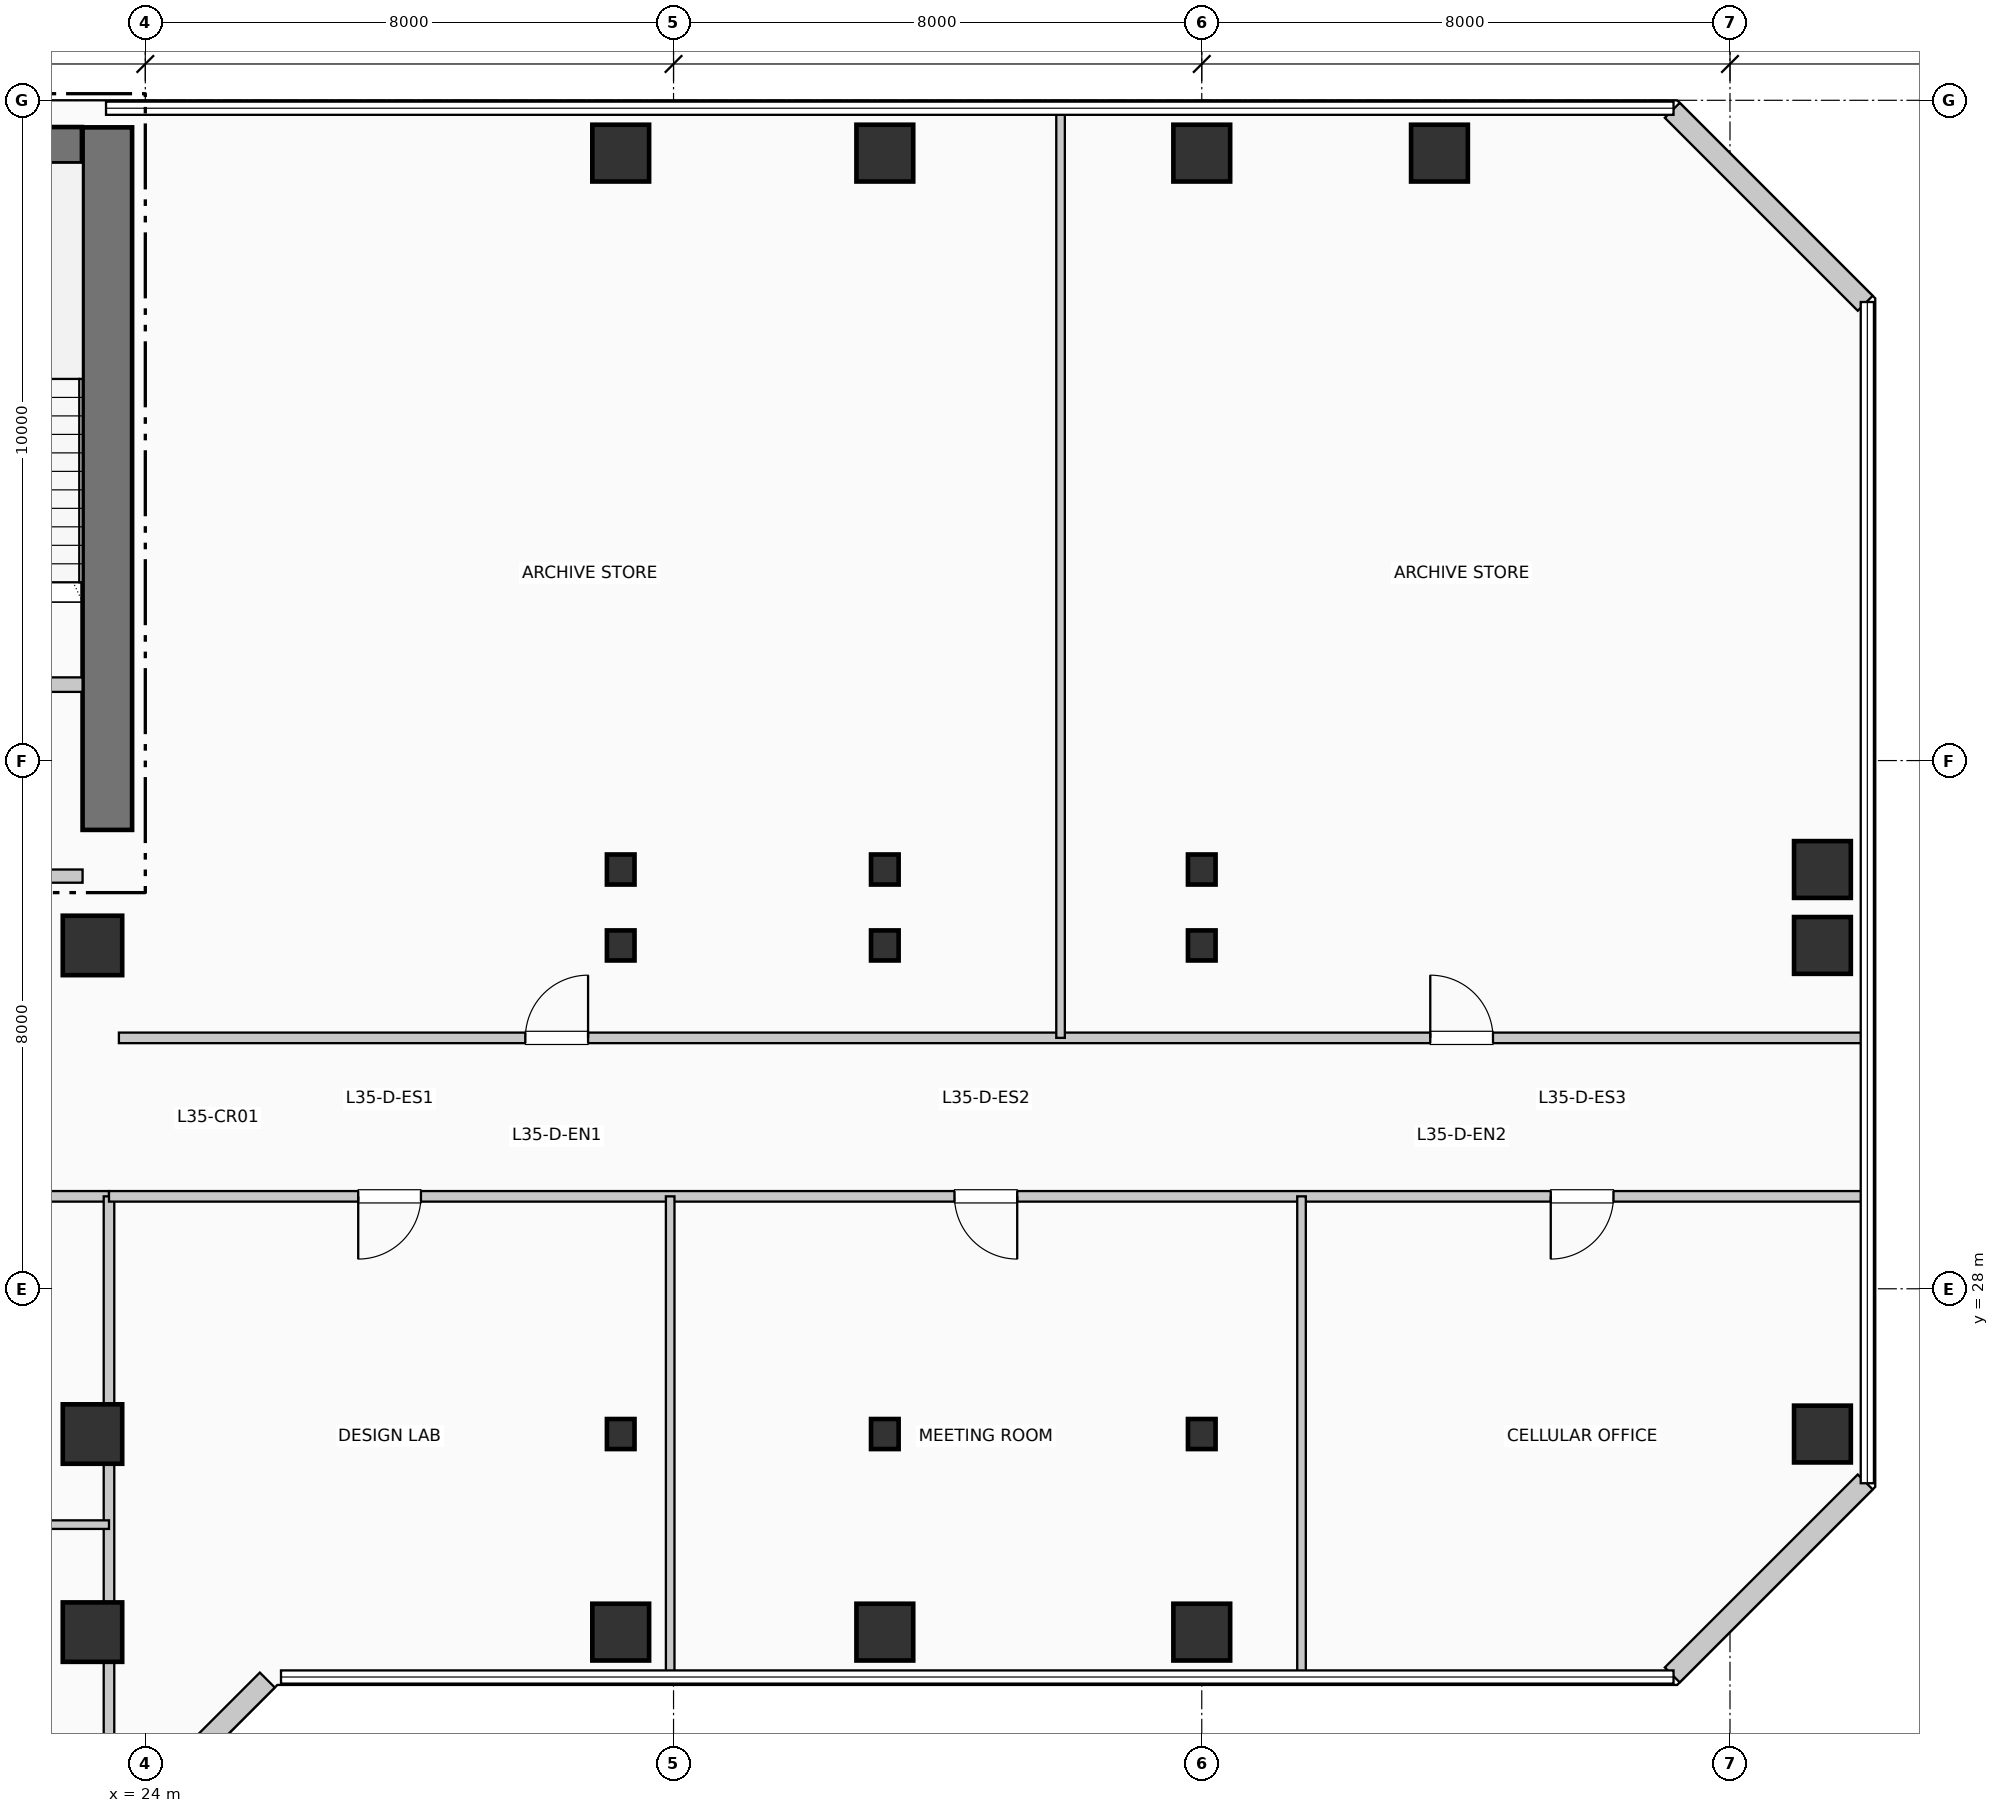
"""IFC4 building model, lengths in metres.
Left out: names, types, materials, properties, quantities, classifications, styles, units other than length and angle.
Written with IfcOpenShell. Run it as: python <this file> out.ifc"""

import sys

from ifc_helpers import new_model, si_unit, direction, frame, frame_2d, origin, origin_2d, place, context, subcontext, project, spatial, rectangle, i_section, extrude, element, fill, save


model = new_model("IFC4")
c1 = context("Model", 3, precision=1e-05, world=origin(), true_north=direction((0.0, 1.0)))
c2 = subcontext(c1, "Body", "Model", "MODEL_VIEW")
j1 = project(units=[si_unit("LENGTHUNIT", "METRE"), si_unit("PLANEANGLEUNIT", "RADIAN")], contexts=[c1])
p1 = place(None, origin())
s1 = spatial("IfcSite", under=j1, at=p1, CompositionType="ELEMENT")
p2 = place(p1, origin())
s2 = spatial("IfcBuilding", under=s1, at=p2, CompositionType="ELEMENT")
p3 = place(p2, frame((0.0, 0.0, 146.85)))
s3 = spatial("IfcBuildingStorey", under=s2, at=p3, CompositionType="ELEMENT", Elevation=146.85)
p4 = place(p3, frame((23.425, 34.95, 0.0), z_axis=(0.0, 0.0, 1.0), x_axis=(0.0, 1.0, 0.0)))
e1 = element("IfcWall", 1, at=p4, inside=s3, PredefinedType="SHEAR", context=c2, shape_type="SweptSolid", body=[
    extrude(rectangle(XDim=10.64, YDim=0.75, at=frame_2d((5.32, 0.0))), origin(), (0.0, 0.0, 1.0), 3.96),
])
p5 = place(p3, frame((19.35, 45.32, 0.0), z_axis=(0.0, 0.0, 1.0), x_axis=(1.0, 0.0, 0.0)))
e2 = element("IfcWall", 2, at=p5, inside=s3, PredefinedType="SHEAR", context=c2, shape_type="SweptSolid", body=[
    extrude(rectangle(XDim=3.69, YDim=0.55, at=frame_2d((1.845, 0.0))), origin(), (0.0, 0.0, 1.0), 3.96),
])
p6 = place(p5, frame((1.15, 0.0, 1.05)))
e3 = element("IfcOpeningElement", 3, at=p6, cuts=e2, PredefinedType="OPENING", context=c2, shape_type="SweptSolid", body=[
    extrude(rectangle(XDim=1.4, YDim=1.8, at=frame_2d((0.7, 0.9))), frame((0.0, 0.285, 0.0), z_axis=(0.0, -1.0, 0.0), x_axis=(1.0, 0.0, 0.0)), (0.0, 0.0, 1.0), 0.57),
])
for number, where, z_axis, x_axis in (
    (4, (23.2, 22.8, 0.0), (0.0, 0.0, 1.0), (1.0, 0.0, 0.0)),
    (5, (23.2, 25.8, 0.0), (0.0, 0.0, 1.0), (1.0, 0.0, 0.0)),
    (6, (23.2, 33.2, 0.0), (0.0, 0.0, 1.0), (1.0, 0.0, 0.0)),
):
    element("IfcColumn", number, at=place(p3, frame(where, z_axis=z_axis, x_axis=x_axis)), inside=s3, PredefinedType="COLUMN", context=c2, shape_type="SweptSolid", body=[
        extrude(rectangle(XDim=0.9, YDim=0.9, at=origin_2d()), origin(), (0.0, 0.0, 1.0), 3.96),
    ])
p7 = place(p3, frame((31.2, 22.8, 0.0), z_axis=(0.0, 0.0, 1.0), x_axis=(1.0, 0.0, 0.0)))
e7 = element("IfcColumn", 7, at=p7, inside=s3, PredefinedType="COLUMN", context=c2, shape_type="SweptSolid", body=[
    extrude(rectangle(XDim=0.86, YDim=0.86, at=origin_2d()), origin(), (0.0, 0.0, 1.0), 3.96),
])
for number, where, z_axis, x_axis in (
    (8, (31.2, 25.8, 0.0), (0.0, 0.0, 1.0), (1.0, 0.0, 0.0)),
    (9, (31.2, 33.2, 0.0), (0.0, 0.0, 1.0), (1.0, 0.0, 0.0)),
    (10, (31.2, 34.35, 0.0), (0.0, 0.0, 1.0), (1.0, 0.0, 0.0)),
):
    element("IfcColumn", number, at=place(p3, frame(where, z_axis=z_axis, x_axis=x_axis)), inside=s3, PredefinedType="COLUMN", context=c2, shape_type="SweptSolid", body=[
        extrude(i_section(OverallWidth=0.418, OverallDepth=0.455, WebThickness=0.032, FlangeThickness=0.051, at=origin_2d()), origin(), (0.0, 0.0, 1.0), 3.96),
    ])
for number, where, z_axis, x_axis in (
    (11, (31.2, 45.2, 0.0), (0.0, 0.0, 1.0), (1.0, 0.0, 0.0)),
    (12, (35.2, 22.8, 0.0), (0.0, 0.0, 1.0), (1.0, 0.0, 0.0)),
):
    element("IfcColumn", number, at=place(p3, frame(where, z_axis=z_axis, x_axis=x_axis)), inside=s3, PredefinedType="COLUMN", context=c2, shape_type="SweptSolid", body=[
        extrude(rectangle(XDim=0.86, YDim=0.86, at=origin_2d()), origin(), (0.0, 0.0, 1.0), 3.96),
    ])
for number, where, z_axis, x_axis in (
    (13, (35.2, 25.8, 0.0), (0.0, 0.0, 1.0), (1.0, 0.0, 0.0)),
    (14, (35.2, 33.2, 0.0), (0.0, 0.0, 1.0), (1.0, 0.0, 0.0)),
    (15, (35.2, 34.35, 0.0), (0.0, 0.0, 1.0), (1.0, 0.0, 0.0)),
):
    element("IfcColumn", number, at=place(p3, frame(where, z_axis=z_axis, x_axis=x_axis)), inside=s3, PredefinedType="COLUMN", context=c2, shape_type="SweptSolid", body=[
        extrude(i_section(OverallWidth=0.418, OverallDepth=0.455, WebThickness=0.032, FlangeThickness=0.051, at=origin_2d()), origin(), (0.0, 0.0, 1.0), 3.96),
    ])
for number, where, z_axis, x_axis in (
    (16, (35.2, 45.2, 0.0), (0.0, 0.0, 1.0), (1.0, 0.0, 0.0)),
    (17, (40.0, 22.8, 0.0), (0.0, 0.0, 1.0), (1.0, 0.0, 0.0)),
):
    element("IfcColumn", number, at=place(p3, frame(where, z_axis=z_axis, x_axis=x_axis)), inside=s3, PredefinedType="COLUMN", context=c2, shape_type="SweptSolid", body=[
        extrude(rectangle(XDim=0.86, YDim=0.86, at=origin_2d()), origin(), (0.0, 0.0, 1.0), 3.96),
    ])
for number, where, z_axis, x_axis in (
    (18, (40.0, 25.8, 0.0), (0.0, 0.0, 1.0), (1.0, 0.0, 0.0)),
    (19, (40.0, 33.2, 0.0), (0.0, 0.0, 1.0), (1.0, 0.0, 0.0)),
    (20, (40.0, 34.35, 0.0), (0.0, 0.0, 1.0), (1.0, 0.0, 0.0)),
):
    element("IfcColumn", number, at=place(p3, frame(where, z_axis=z_axis, x_axis=x_axis)), inside=s3, PredefinedType="COLUMN", context=c2, shape_type="SweptSolid", body=[
        extrude(i_section(OverallWidth=0.418, OverallDepth=0.455, WebThickness=0.032, FlangeThickness=0.051, at=origin_2d()), origin(), (0.0, 0.0, 1.0), 3.96),
    ])
for number, where, z_axis, x_axis in (
    (21, (40.0, 45.2, 0.0), (0.0, 0.0, 1.0), (1.0, 0.0, 0.0)),
    (22, (43.6, 45.2, 0.0), (0.0, 0.0, 1.0), (1.0, 0.0, 0.0)),
    (23, (49.4, 25.8, 0.0), (0.0, 0.0, 1.0), (1.0, 0.0, 0.0)),
    (24, (49.4, 33.2, 0.0), (0.0, 0.0, 1.0), (1.0, 0.0, 0.0)),
    (25, (49.4, 34.35, 0.0), (0.0, 0.0, 1.0), (1.0, 0.0, 0.0)),
):
    element("IfcColumn", number, at=place(p3, frame(where, z_axis=z_axis, x_axis=x_axis)), inside=s3, PredefinedType="COLUMN", context=c2, shape_type="SweptSolid", body=[
        extrude(rectangle(XDim=0.86, YDim=0.86, at=origin_2d()), origin(), (0.0, 0.0, 1.0), 3.96),
    ])
p8 = place(p3, frame((23.926, 20.152, 0.0), z_axis=(0.0, 0.0, 1.0), x_axis=(0.707106781187, 0.707106781187, 0.0)))
e26 = element("IfcWall", 26, at=p8, inside=s3, PredefinedType="SOLIDWALL", context=c2, shape_type="SweptSolid", body=[
    extrude(rectangle(XDim=2.718, YDim=0.32, at=frame_2d((1.359, 0.0))), origin(), (0.0, 0.0, 1.0), 3.71),
])
for number, where, z_axis, x_axis in (
    (27, (47.126, 22.152, 0.0), (0.0, 0.0, 1.0), (0.707, 0.707, 0.0)),
    (28, (50.048, 42.926, 0.0), (0.0, 0.0, 1.0), (-0.707, 0.707, 0.0)),
):
    element("IfcWall", number, at=place(p3, frame(where, z_axis=z_axis, x_axis=x_axis)), inside=s3, PredefinedType="SOLIDWALL", context=c2, shape_type="SweptSolid", body=[
        extrude(rectangle(XDim=4.133, YDim=0.32, at=frame_2d((2.066, 0.0))), origin(), (0.0, 0.0, 1.0), 3.71),
    ])
p9 = place(p3, frame((19.9, 37.15, 0.0), z_axis=(0.0, 0.0, 1.0), x_axis=(1.0, 0.0, 0.0)))
e29 = element("IfcWall", 29, at=p9, inside=s3, PredefinedType="PARTITIONING", context=c2, shape_type="SweptSolid", body=[
    extrude(rectangle(XDim=3.15, YDim=0.22, at=frame_2d((1.575, 0.0))), origin(), (0.0, 0.0, 1.0), 3.71),
])
p10 = place(p9, frame((2.05, 0.0, 0.0), z_axis=(0.0, 0.0, 1.0), x_axis=(-1.0, 0.0, 0.0)))
e30 = element("IfcOpeningElement", 30, at=p10, cuts=e29, PredefinedType="OPENING", context=c2, shape_type="SweptSolid", body=[
    extrude(rectangle(XDim=1.05, YDim=2.15, at=frame_2d((0.525, 1.075))), frame((0.0, 0.12, 0.0), z_axis=(0.0, -1.0, 0.0), x_axis=(1.0, 0.0, 0.0)), (0.0, 0.0, 1.0), 0.24),
])
p11 = place(p3, frame((19.8, 34.25, 0.0), z_axis=(0.0, 0.0, 1.0), x_axis=(1.0, 0.0, 0.0)))
e31 = element("IfcWall", 31, at=p11, inside=s3, PredefinedType="PARTITIONING", context=c2, shape_type="SweptSolid", body=[
    extrude(rectangle(XDim=3.25, YDim=0.2, at=frame_2d((1.625, 0.0))), origin(), (0.0, 0.0, 1.0), 3.71),
])
p12 = place(p11, frame((2.15, 0.0, 0.0), z_axis=(0.0, 0.0, 1.0), x_axis=(-1.0, 0.0, 0.0)))
e32 = element("IfcOpeningElement", 32, at=p12, cuts=e31, PredefinedType="OPENING", context=c2, shape_type="SweptSolid", body=[
    extrude(rectangle(XDim=1.1, YDim=2.15, at=frame_2d((0.55, 1.075))), frame((0.0, 0.11, 0.0), z_axis=(0.0, -1.0, 0.0), x_axis=(1.0, 0.0, 0.0)), (0.0, 0.0, 1.0), 0.22),
])
p13 = place(p3, frame((9.04, 29.4, 0.0), z_axis=(0.0, 0.0, 1.0), x_axis=(1.0, 0.0, 0.0)))
e33 = element("IfcWall", 33, at=p13, inside=s3, PredefinedType="PARTITIONING", context=c2, shape_type="SweptSolid", body=[
    extrude(rectangle(XDim=14.41, YDim=0.16, at=frame_2d((7.205, 0.0))), origin(), (0.0, 0.0, 1.0), 3.365),
])
p14 = place(p3, frame((23.45, 1.04, 0.0), z_axis=(0.0, 0.0, 1.0), x_axis=(0.0, 1.0, 0.0)))
e34 = element("IfcWall", 34, at=p14, inside=s3, PredefinedType="PARTITIONING", context=c2, shape_type="SweptSolid", body=[
    extrude(rectangle(XDim=28.36, YDim=0.16, at=frame_2d((14.18, 0.0))), origin(), (0.0, 0.0, 1.0), 3.045),
])
p15 = place(p3, frame((9.04, 24.428, 0.0), z_axis=(0.0, 0.0, 1.0), x_axis=(1.0, 0.0, 0.0)))
e35 = element("IfcWall", 35, at=p15, inside=s3, PredefinedType="PARTITIONING", context=c2, shape_type="SweptSolid", body=[
    extrude(rectangle(XDim=14.41, YDim=0.13, at=frame_2d((7.205, 0.0))), origin(), (0.0, 0.0, 1.0), 3.71),
])
p16 = place(p3, frame((23.45, 29.4, 0.0), z_axis=(0.0, 0.0, 1.0), x_axis=(1.0, 0.0, 0.0)))
e36 = element("IfcWall", 36, at=p16, inside=s3, PredefinedType="PARTITIONING", context=c2, shape_type="SweptSolid", body=[
    extrude(rectangle(XDim=26.56, YDim=0.16, at=frame_2d((13.28, 0.0))), origin(), (0.0, 0.0, 1.0), 3.365),
])
p17 = place(p16, frame((4.725, 0.0, 0.0), z_axis=(0.0, 0.0, 1.0), x_axis=(-1.0, 0.0, 0.0)))
e37 = element("IfcOpeningElement", 37, at=p17, cuts=e36, PredefinedType="OPENING", context=c2, shape_type="SweptSolid", body=[
    extrude(rectangle(XDim=0.95, YDim=2.15, at=frame_2d((0.475, 1.075))), frame((0.0, 0.09, 0.0), z_axis=(0.0, -1.0, 0.0), x_axis=(1.0, 0.0, 0.0)), (0.0, 0.0, 1.0), 0.18),
])
p18 = place(p16, frame((13.755, 0.0, 0.0), z_axis=(0.0, 0.0, 1.0), x_axis=(-1.0, 0.0, 0.0)))
e38 = element("IfcOpeningElement", 38, at=p18, cuts=e36, PredefinedType="OPENING", context=c2, shape_type="SweptSolid", body=[
    extrude(rectangle(XDim=0.95, YDim=2.15, at=frame_2d((0.475, 1.075))), frame((0.0, 0.09, 0.0), z_axis=(0.0, -1.0, 0.0), x_axis=(1.0, 0.0, 0.0)), (0.0, 0.0, 1.0), 0.18),
])
p19 = place(p16, frame((22.785, 0.0, 0.0), z_axis=(0.0, 0.0, 1.0), x_axis=(-1.0, 0.0, 0.0)))
e39 = element("IfcOpeningElement", 39, at=p19, cuts=e36, PredefinedType="OPENING", context=c2, shape_type="SweptSolid", body=[
    extrude(rectangle(XDim=0.95, YDim=2.15, at=frame_2d((0.475, 1.075))), frame((0.0, 0.09, 0.0), z_axis=(0.0, -1.0, 0.0), x_axis=(1.0, 0.0, 0.0)), (0.0, 0.0, 1.0), 0.18),
])
p20 = place(p3, frame((23.6, 31.8, 0.0), z_axis=(0.0, 0.0, 1.0), x_axis=(1.0, 0.0, 0.0)))
e40 = element("IfcWall", 40, at=p20, inside=s3, PredefinedType="PARTITIONING", context=c2, shape_type="SweptSolid", body=[
    extrude(rectangle(XDim=26.41, YDim=0.16, at=frame_2d((13.205, 0.0))), origin(), (0.0, 0.0, 1.0), 3.71),
])
p21 = place(p20, frame((6.156, 0.0, 0.0)))
e41 = element("IfcOpeningElement", 41, at=p21, cuts=e40, PredefinedType="OPENING", context=c2, shape_type="SweptSolid", body=[
    extrude(rectangle(XDim=0.95, YDim=2.15, at=frame_2d((0.475, 1.075))), frame((0.0, 0.09, 0.0), z_axis=(0.0, -1.0, 0.0), x_axis=(1.0, 0.0, 0.0)), (0.0, 0.0, 1.0), 0.18),
])
p22 = place(p20, frame((19.861, 0.0, 0.0)))
e42 = element("IfcOpeningElement", 42, at=p22, cuts=e40, PredefinedType="OPENING", context=c2, shape_type="SweptSolid", body=[
    extrude(rectangle(XDim=0.95, YDim=2.15, at=frame_2d((0.475, 1.075))), frame((0.0, 0.09, 0.0), z_axis=(0.0, -1.0, 0.0), x_axis=(1.0, 0.0, 0.0)), (0.0, 0.0, 1.0), 0.18),
])
for number, where, z_axis, x_axis in (
    (43, (31.949, 22.19, 0.0), (0.0, 0.0, 1.0), (0.0, 1.0, 0.0)),
    (44, (41.511, 22.19, 0.0), (0.0, 0.0, 1.0), (0.0, 1.0, 0.0)),
):
    element("IfcWall", number, at=place(p3, frame(where, z_axis=z_axis, x_axis=x_axis)), inside=s3, PredefinedType="PARTITIONING", context=c2, shape_type="SweptSolid", body=[
        extrude(rectangle(XDim=7.21, YDim=0.13, at=frame_2d((3.605, 0.0))), origin(), (0.0, 0.0, 1.0), 3.71),
    ])
p23 = place(p3, frame((37.861, 31.8, 0.0), z_axis=(0.0, 0.0, 1.0), x_axis=(0.0, 1.0, 0.0)))
e45 = element("IfcWall", 45, at=p23, inside=s3, PredefinedType="PARTITIONING", context=c2, shape_type="SweptSolid", body=[
    extrude(rectangle(XDim=14.01, YDim=0.13, at=frame_2d((7.005, 0.0))), origin(), (0.0, 0.0, 1.0), 3.71),
])
p24 = place(p17, origin())
e46 = element("IfcDoor", 46, at=p24, inside=s3, OperationType="SINGLE_SWING_LEFT", PredefinedType="DOOR", context=c2, shape_type="SweptSolid", body=[
    extrude(rectangle(XDim=0.95, YDim=2.15, at=frame_2d((0.475, 1.075))), frame((0.0, 0.025, 0.0), z_axis=(0.0, -1.0, 0.0), x_axis=(1.0, 0.0, 0.0)), (0.0, 0.0, 1.0), 0.05),
])
fill(e37, e46)
p25 = place(p18, origin())
e47 = element("IfcDoor", 47, at=p25, inside=s3, OperationType="SINGLE_SWING_RIGHT", PredefinedType="DOOR", context=c2, shape_type="SweptSolid", body=[
    extrude(rectangle(XDim=0.95, YDim=2.15, at=frame_2d((0.475, 1.075))), frame((0.0, 0.025, 0.0), z_axis=(0.0, -1.0, 0.0), x_axis=(1.0, 0.0, 0.0)), (0.0, 0.0, 1.0), 0.05),
])
fill(e38, e47)
p26 = place(p19, origin())
e48 = element("IfcDoor", 48, at=p26, inside=s3, OperationType="SINGLE_SWING_LEFT", PredefinedType="DOOR", context=c2, shape_type="SweptSolid", body=[
    extrude(rectangle(XDim=0.95, YDim=2.15, at=frame_2d((0.475, 1.075))), frame((0.0, 0.025, 0.0), z_axis=(0.0, -1.0, 0.0), x_axis=(1.0, 0.0, 0.0)), (0.0, 0.0, 1.0), 0.05),
])
fill(e39, e48)
p27 = place(p21, origin())
e49 = element("IfcDoor", 49, at=p27, inside=s3, OperationType="SINGLE_SWING_RIGHT", PredefinedType="DOOR", context=c2, shape_type="SweptSolid", body=[
    extrude(rectangle(XDim=0.95, YDim=2.15, at=frame_2d((0.475, 1.075))), frame((0.0, 0.025, 0.0), z_axis=(0.0, -1.0, 0.0), x_axis=(1.0, 0.0, 0.0)), (0.0, 0.0, 1.0), 0.05),
])
fill(e41, e49)
p28 = place(p22, origin())
e50 = element("IfcDoor", 50, at=p28, inside=s3, OperationType="SINGLE_SWING_LEFT", PredefinedType="DOOR", context=c2, shape_type="SweptSolid", body=[
    extrude(rectangle(XDim=0.95, YDim=2.15, at=frame_2d((0.475, 1.075))), frame((0.0, 0.025, 0.0), z_axis=(0.0, -1.0, 0.0), x_axis=(1.0, 0.0, 0.0)), (0.0, 0.0, 1.0), 0.05),
])
fill(e42, e50)
save(model, sys.argv[1])
